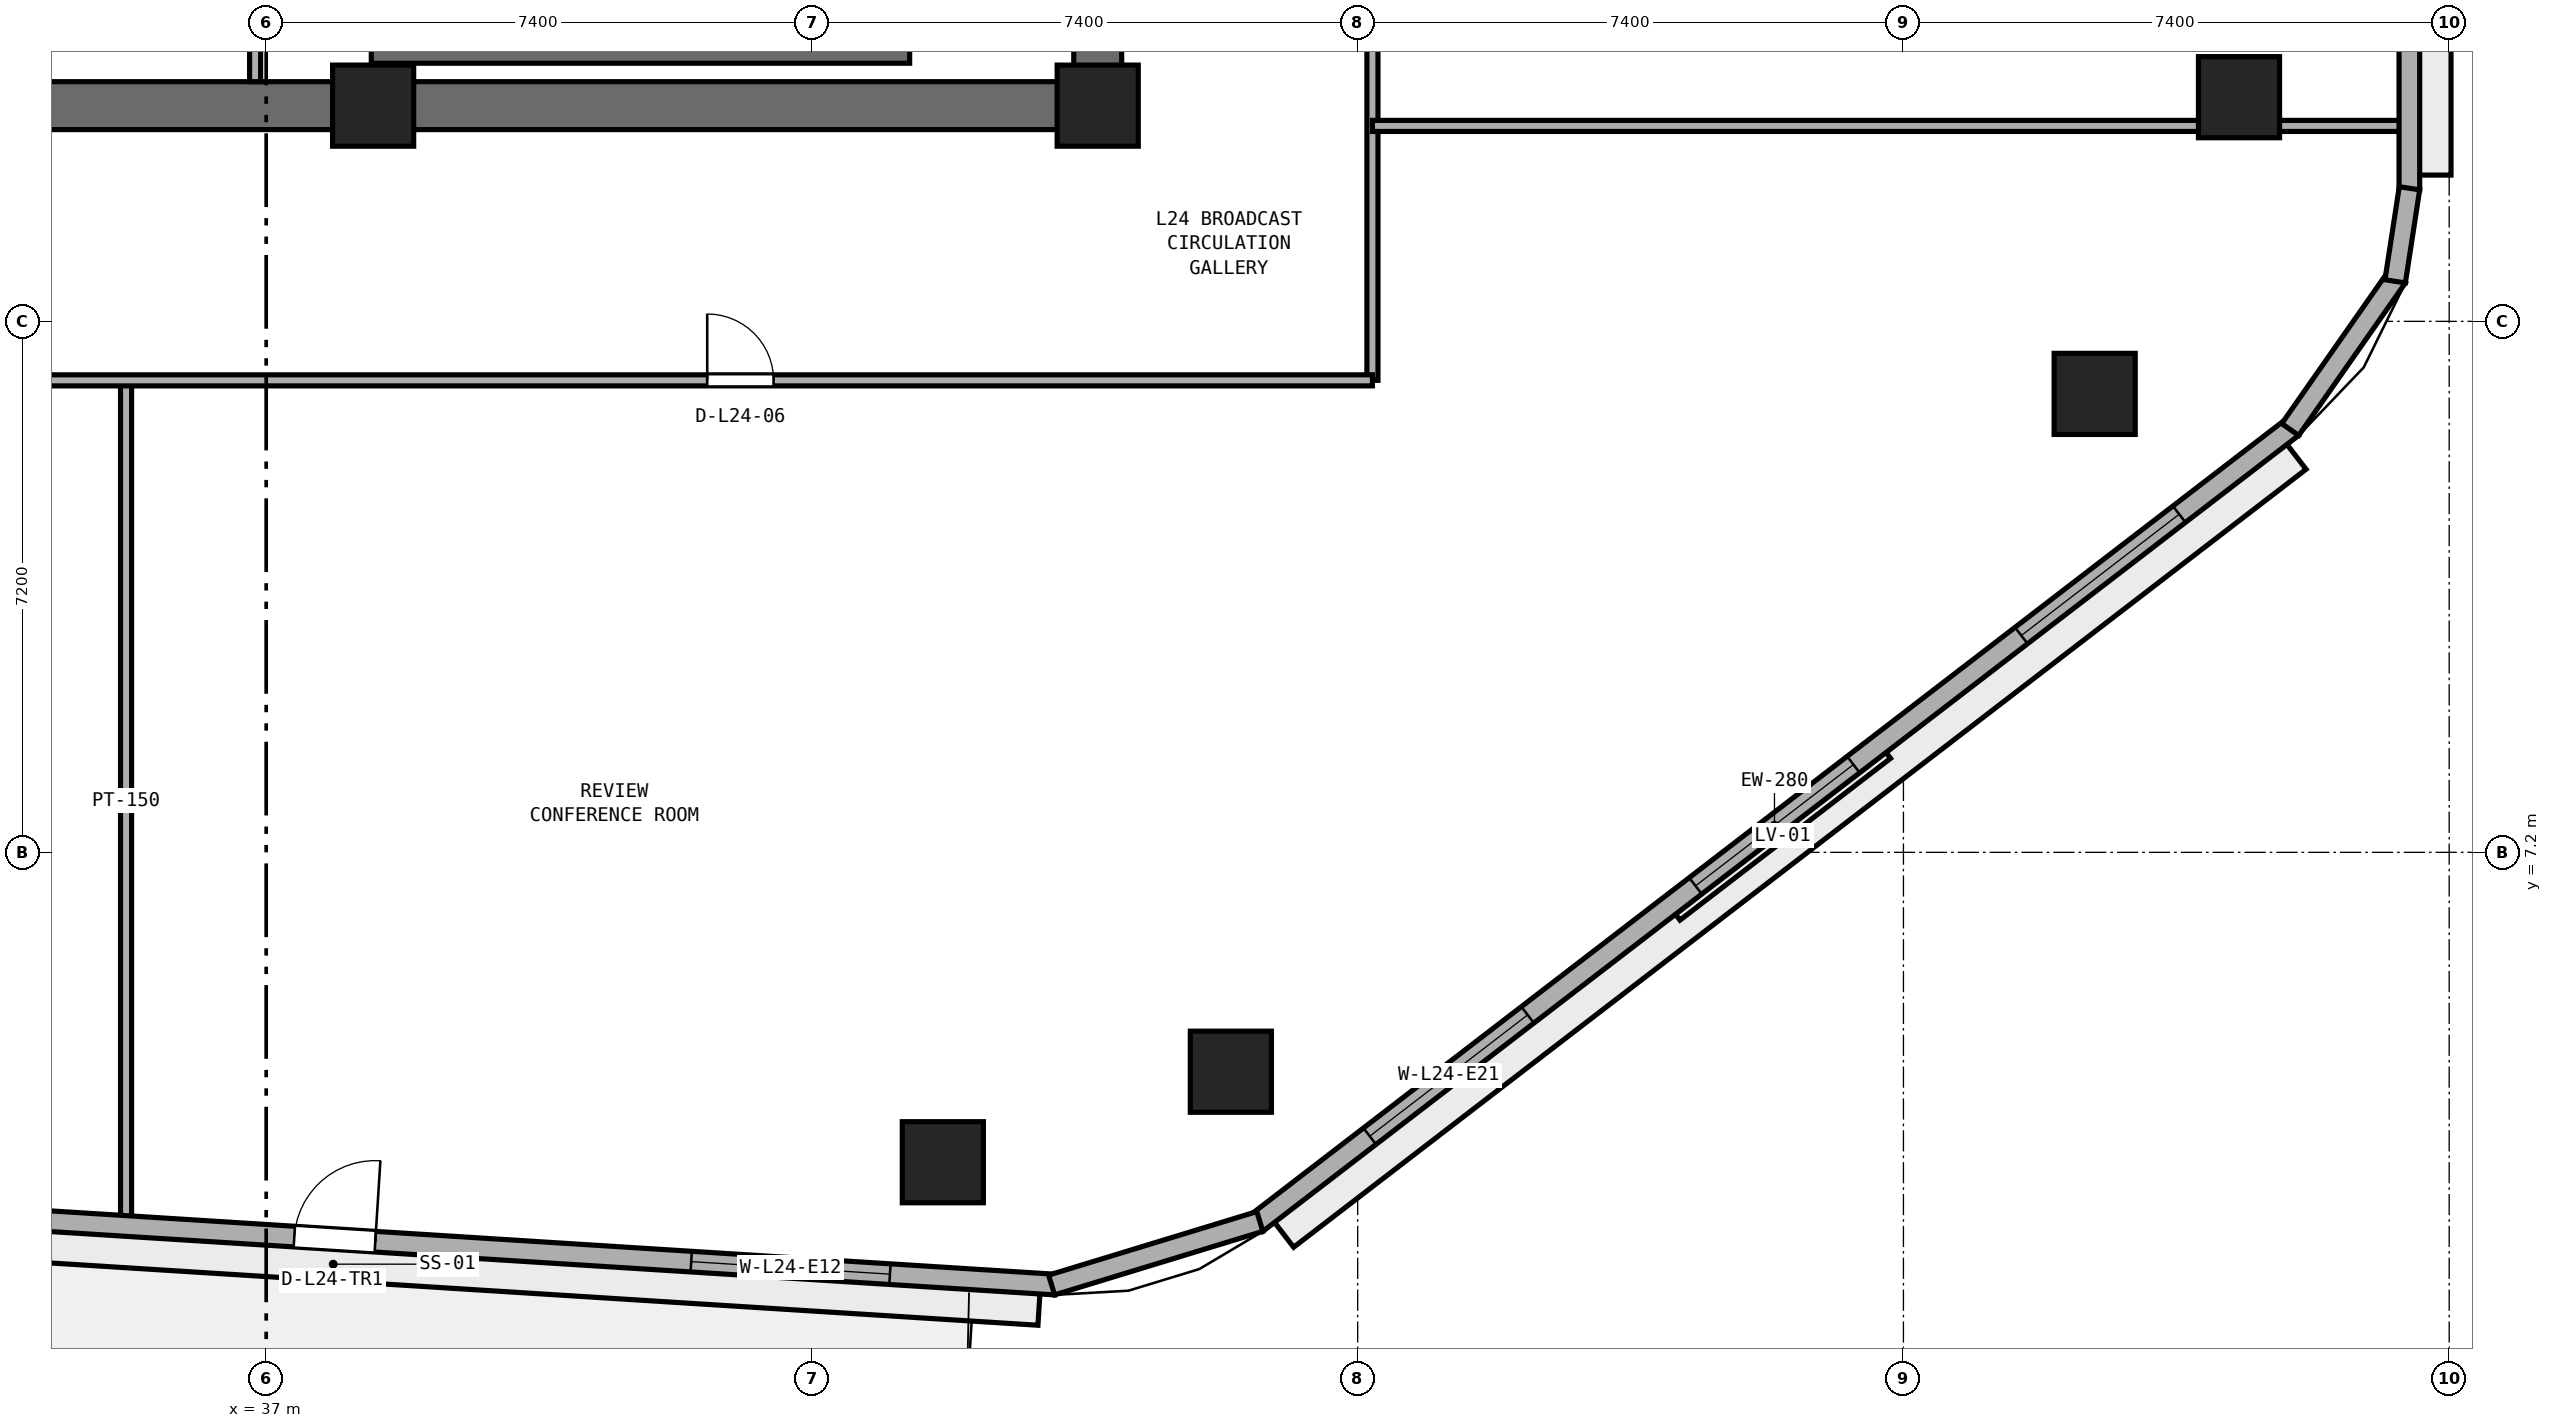
"""IFC4 building model, lengths in metres.
Left out: names, types, materials, properties, quantities, classifications, styles, units other than length and angle.
Written with IfcOpenShell. Run it as: python <this file> out.ifc"""

import sys

from ifc_helpers import new_model, si_unit, direction, frame, frame_2d, origin, origin_2d, place, context, subcontext, project, spatial, rectangle, extrude, element, fill, save


model = new_model("IFC4")
c1 = context("Model", 3, precision=1e-05, world=origin(), true_north=direction((0.0, 1.0)))
c2 = subcontext(c1, "Body", "Model", "MODEL_VIEW")
j1 = project(units=[si_unit("LENGTHUNIT", "METRE"), si_unit("PLANEANGLEUNIT", "RADIAN")], contexts=[c1])
p1 = place(None, origin())
s1 = spatial("IfcSite", under=j1, at=p1, CompositionType="ELEMENT")
p2 = place(p1, origin())
s2 = spatial("IfcBuilding", under=s1, at=p2, CompositionType="ELEMENT")
p3 = place(p2, frame((0.0, 0.0, 97.2)))
s3 = spatial("IfcBuildingStorey", under=s2, at=p3, CompositionType="ELEMENT", Elevation=97.2)
p4 = place(p3, frame((25.4, 17.325, 0.0), z_axis=(0.0, 0.0, 1.0), x_axis=(1.0, 0.0, 0.0)))
e1 = element("IfcWall", 1, at=p4, inside=s3, PredefinedType="SHEAR", context=c2, shape_type="SweptSolid", body=[
    extrude(rectangle(XDim=23.2, YDim=0.65, at=frame_2d((11.6, 0.0))), origin(), (0.0, 0.0, 1.0), 3.525),
])
p5 = place(p3, frame((48.275, 17.65, 0.0), z_axis=(0.0, 0.0, 1.0), x_axis=(0.0, 1.0, 0.0)))
e2 = element("IfcWall", 2, at=p5, inside=s3, PredefinedType="SHEAR", context=c2, shape_type="SweptSolid", body=[
    extrude(rectangle(XDim=15.1, YDim=0.65, at=frame_2d((7.55, 0.0))), origin(), (0.0, 0.0, 1.0), 3.525),
])
p6 = place(p5, frame((5.65, 0.0, 0.0)))
e3 = element("IfcOpeningElement", 3, at=p6, cuts=e2, PredefinedType="OPENING", context=c2, shape_type="SweptSolid", body=[
    extrude(rectangle(XDim=1.5, YDim=2.15, at=frame_2d((0.75, 1.075))), frame((0.0, 0.335, 0.0), z_axis=(0.0, -1.0, 0.0), x_axis=(1.0, 0.0, 0.0)), (0.0, 0.0, 1.0), 0.67),
])
for number, where, z_axis, x_axis in (
    (4, (38.45, 17.325, 0.0), (0.0, 0.0, 1.0), (1.0, 0.0, 0.0)),
    (5, (48.275, 17.325, 0.0), (0.0, 0.0, 1.0), (1.0, 0.0, 0.0)),
):
    element("IfcColumn", number, at=place(p3, frame(where, z_axis=z_axis, x_axis=x_axis)), inside=s3, PredefinedType="PILASTER", context=c2, shape_type="SweptSolid", body=[
        extrude(rectangle(XDim=1.1, YDim=1.1, at=origin_2d()), origin(), (0.0, 0.0, 1.0), 3.8),
    ])
for number, where, z_axis, x_axis in (
    (6, (46.175, 2.998, 0.0), (0.0, 0.0, 1.0), (1.0, 0.0, 0.0)),
    (7, (50.081, 4.225, 0.0), (0.0, 0.0, 1.0), (1.0, 0.0, 0.0)),
    (8, (61.793, 13.416, 0.0), (0.0, 0.0, 1.0), (1.0, 0.0, 0.0)),
    (9, (63.75, 17.44, 0.0), (0.0, 0.0, 1.0), (1.0, 0.0, 0.0)),
):
    element("IfcColumn", number, at=place(p3, frame(where, z_axis=z_axis, x_axis=x_axis)), inside=s3, PredefinedType="COLUMN", context=c2, shape_type="SweptSolid", body=[
        extrude(rectangle(XDim=1.1, YDim=1.1, at=origin_2d()), origin(), (0.0, 0.0, 1.0), 3.8),
    ])
p7 = place(p3, frame((38.425, 18.025, 0.0), z_axis=(0.0, 0.0, 1.0), x_axis=(1.0, 0.0, 0.0)))
e10 = element("IfcWall", 10, at=p7, inside=s3, PredefinedType="SHEAR", context=c2, shape_type="SweptSolid", body=[
    extrude(rectangle(XDim=7.3, YDim=0.25, at=frame_2d((3.65, 0.0))), origin(), (0.0, 0.0, 1.0), 3.525),
])
p8 = place(p3, frame((36.85, 17.65, 0.0), z_axis=(0.0, 0.0, 1.0), x_axis=(0.0, 1.0, 0.0)))
e11 = element("IfcWall", 11, at=p8, inside=s3, PredefinedType="PARTITIONING", context=c2, shape_type="SweptSolid", body=[
    extrude(rectangle(XDim=2.1, YDim=0.15, at=frame_2d((1.05, 0.0))), origin(), (0.0, 0.0, 1.0), 3.525),
])
p9 = place(p3, frame((52.0, 13.6, 0.0), z_axis=(0.0, 0.0, 1.0), x_axis=(0.0, 1.0, 0.0)))
e12 = element("IfcWall", 12, at=p9, inside=s3, PredefinedType="PARTITIONING", context=c2, shape_type="SweptSolid", body=[
    extrude(rectangle(XDim=33.691, YDim=0.15, at=frame_2d((16.846, 0.0))), origin(), (0.0, 0.0, 1.0), 3.525),
])
p10 = place(p9, frame((6.075, 0.0, 0.0)))
e13 = element("IfcOpeningElement", 13, at=p10, cuts=e12, PredefinedType="OPENING", context=c2, shape_type="SweptSolid", body=[
    extrude(rectangle(XDim=1.0, YDim=2.12, at=frame_2d((0.5, 1.06))), frame((0.0, 0.085, 0.0), z_axis=(0.0, -1.0, 0.0), x_axis=(1.0, 0.0, 0.0)), (0.0, 0.0, 1.0), 0.17),
])
p11 = place(p9, frame((12.6, 0.0, 0.0)))
e14 = element("IfcOpeningElement", 14, at=p11, cuts=e12, PredefinedType="OPENING", context=c2, shape_type="SweptSolid", body=[
    extrude(rectangle(XDim=1.0, YDim=2.12, at=frame_2d((0.5, 1.06))), frame((0.0, 0.085, 0.0), z_axis=(0.0, -1.0, 0.0), x_axis=(1.0, 0.0, 0.0)), (0.0, 0.0, 1.0), 0.17),
])
p12 = place(p9, frame((19.35, 0.0, 0.0)))
e15 = element("IfcOpeningElement", 15, at=p12, cuts=e12, PredefinedType="OPENING", context=c2, shape_type="SweptSolid", body=[
    extrude(rectangle(XDim=1.0, YDim=2.12, at=frame_2d((0.5, 1.06))), frame((0.0, 0.085, 0.0), z_axis=(0.0, -1.0, 0.0), x_axis=(1.0, 0.0, 0.0)), (0.0, 0.0, 1.0), 0.17),
])
p13 = place(p3, frame((35.1, 2.198, 0.0), z_axis=(0.0, 0.0, 1.0), x_axis=(0.0, 1.0, 0.0)))
e16 = element("IfcWall", 16, at=p13, inside=s3, PredefinedType="PARTITIONING", context=c2, shape_type="SweptSolid", body=[
    extrude(rectangle(XDim=11.402, YDim=0.15, at=frame_2d((5.701, 0.0))), origin(), (0.0, 0.0, 1.0), 3.525),
])
p14 = place(p3, frame((22.0, 13.6, 0.0), z_axis=(0.0, 0.0, 1.0), x_axis=(1.0, 0.0, 0.0)))
e17 = element("IfcWall", 17, at=p14, inside=s3, PredefinedType="PARTITIONING", context=c2, shape_type="SweptSolid", body=[
    extrude(rectangle(XDim=30.0, YDim=0.15, at=frame_2d((15.0, 0.0))), origin(), (0.0, 0.0, 1.0), 3.525),
])
p15 = place(p14, frame((6.22, 0.0, 0.0)))
e18 = element("IfcOpeningElement", 18, at=p15, cuts=e17, PredefinedType="OPENING", context=c2, shape_type="SweptSolid", body=[
    extrude(rectangle(XDim=0.9, YDim=2.1, at=frame_2d((0.45, 1.05))), frame((0.0, 0.085, 0.0), z_axis=(0.0, -1.0, 0.0), x_axis=(1.0, 0.0, 0.0)), (0.0, 0.0, 1.0), 0.17),
])
p16 = place(p14, frame((20.98, 0.0, 0.0)))
e19 = element("IfcOpeningElement", 19, at=p16, cuts=e17, PredefinedType="OPENING", context=c2, shape_type="SweptSolid", body=[
    extrude(rectangle(XDim=0.9, YDim=2.1, at=frame_2d((0.45, 1.05))), frame((0.0, 0.085, 0.0), z_axis=(0.0, -1.0, 0.0), x_axis=(1.0, 0.0, 0.0)), (0.0, 0.0, 1.0), 0.17),
])
p17 = place(p3, frame((52.0, 17.05, 0.0), z_axis=(0.0, 0.0, 1.0), x_axis=(1.0, 0.0, 0.0)))
e20 = element("IfcWall", 20, at=p17, inside=s3, PredefinedType="PARTITIONING", context=c2, shape_type="SweptSolid", body=[
    extrude(rectangle(XDim=13.995, YDim=0.15, at=frame_2d((6.998, 0.0))), origin(), (0.0, 0.0, 1.0), 3.525),
])
p18 = place(p3, frame((28.161, 2.571, 0.0), z_axis=(0.0, 0.0, 1.0), x_axis=(0.998017288298, -0.06294038654, 0.0)))
e21 = element("IfcWall", 21, at=p18, inside=s3, PredefinedType="STANDARD", context=c2, shape_type="SweptSolid", body=[
    extrude(rectangle(XDim=19.577, YDim=0.28, at=frame_2d((9.789, 0.0))), origin(), (0.0, 0.0, 1.0), 3.525),
])
p19 = place(p18, frame((9.239, 0.0, 0.0)))
e22 = element("IfcOpeningElement", 22, at=p19, cuts=e21, PredefinedType="OPENING", context=c2, shape_type="SweptSolid", body=[
    extrude(rectangle(XDim=1.1, YDim=2.2, at=frame_2d((0.55, 1.1))), frame((0.0, 0.15, 0.0), z_axis=(0.0, -1.0, 0.0), x_axis=(1.0, 0.0, 0.0)), (0.0, 0.0, 1.0), 0.3),
])
p20 = place(p18, frame((2.246, 0.0, 0.9)))
e23 = element("IfcOpeningElement", 23, at=p20, cuts=e21, PredefinedType="OPENING", context=c2, shape_type="SweptSolid", body=[
    extrude(rectangle(XDim=2.7, YDim=1.75, at=frame_2d((1.35, 0.875))), frame((0.0, 0.15, 0.0), z_axis=(0.0, -1.0, 0.0), x_axis=(1.0, 0.0, 0.0)), (0.0, 0.0, 1.0), 0.3),
])
p21 = place(p18, frame((14.631, 0.0, 0.9)))
e24 = element("IfcOpeningElement", 24, at=p21, cuts=e21, PredefinedType="OPENING", context=c2, shape_type="SweptSolid", body=[
    extrude(rectangle(XDim=2.7, YDim=1.75, at=frame_2d((1.35, 0.875))), frame((0.0, 0.15, 0.0), z_axis=(0.0, -1.0, 0.0), x_axis=(1.0, 0.0, 0.0)), (0.0, 0.0, 1.0), 0.3),
])
p22 = place(p3, frame((50.429, 2.172, 0.0), z_axis=(0.0, 0.0, 1.0), x_axis=(0.792937466367, 0.609303023488, 0.0)))
e25 = element("IfcWall", 25, at=p22, inside=s3, PredefinedType="STANDARD", context=c2, shape_type="SweptSolid", body=[
    extrude(rectangle(XDim=17.713, YDim=0.28, at=frame_2d((8.856, 0.0))), origin(), (0.0, 0.0, 1.0), 3.525),
])
p23 = place(p22, frame((1.936, 0.0, 0.9)))
e26 = element("IfcOpeningElement", 26, at=p23, cuts=e25, PredefinedType="OPENING", context=c2, shape_type="SweptSolid", body=[
    extrude(rectangle(XDim=2.7, YDim=1.75, at=frame_2d((1.35, 0.875))), frame((0.0, 0.15, 0.0), z_axis=(0.0, -1.0, 0.0), x_axis=(1.0, 0.0, 0.0)), (0.0, 0.0, 1.0), 0.3),
])
p24 = place(p22, frame((7.506, 0.0, 0.9)))
e27 = element("IfcOpeningElement", 27, at=p24, cuts=e25, PredefinedType="OPENING", context=c2, shape_type="SweptSolid", body=[
    extrude(rectangle(XDim=2.7, YDim=1.75, at=frame_2d((1.35, 0.875))), frame((0.0, 0.15, 0.0), z_axis=(0.0, -1.0, 0.0), x_axis=(1.0, 0.0, 0.0)), (0.0, 0.0, 1.0), 0.3),
])
p25 = place(p22, frame((13.077, 0.0, 0.9)))
e28 = element("IfcOpeningElement", 28, at=p25, cuts=e25, PredefinedType="OPENING", context=c2, shape_type="SweptSolid", body=[
    extrude(rectangle(XDim=2.7, YDim=1.75, at=frame_2d((1.35, 0.875))), frame((0.0, 0.15, 0.0), z_axis=(0.0, -1.0, 0.0), x_axis=(1.0, 0.0, 0.0)), (0.0, 0.0, 1.0), 0.3),
])
p26 = place(p3, frame((66.06, 16.183, 0.0), z_axis=(0.0, 0.0, 1.0), x_axis=(0.0, 1.0, 0.0)))
e29 = element("IfcWall", 29, at=p26, inside=s3, PredefinedType="STANDARD", context=c2, shape_type="SweptSolid", body=[
    extrude(rectangle(XDim=19.331, YDim=0.28, at=frame_2d((9.666, 0.0))), origin(), (0.0, 0.0, 1.0), 3.525),
])
p27 = place(p26, frame((2.205, 0.0, 0.9)))
e30 = element("IfcOpeningElement", 30, at=p27, cuts=e29, PredefinedType="OPENING", context=c2, shape_type="SweptSolid", body=[
    extrude(rectangle(XDim=2.7, YDim=1.75, at=frame_2d((1.35, 0.875))), frame((0.0, 0.15, 0.0), z_axis=(0.0, -1.0, 0.0), x_axis=(1.0, 0.0, 0.0)), (0.0, 0.0, 1.0), 0.3),
])
p28 = place(p26, frame((8.315, 0.0, 0.9)))
e31 = element("IfcOpeningElement", 31, at=p28, cuts=e29, PredefinedType="OPENING", context=c2, shape_type="SweptSolid", body=[
    extrude(rectangle(XDim=2.7, YDim=1.75, at=frame_2d((1.35, 0.875))), frame((0.0, 0.15, 0.0), z_axis=(0.0, -1.0, 0.0), x_axis=(1.0, 0.0, 0.0)), (0.0, 0.0, 1.0), 0.3),
])
p29 = place(p26, frame((14.426, 0.0, 0.9)))
e32 = element("IfcOpeningElement", 32, at=p29, cuts=e29, PredefinedType="OPENING", context=c2, shape_type="SweptSolid", body=[
    extrude(rectangle(XDim=2.7, YDim=1.75, at=frame_2d((1.35, 0.875))), frame((0.0, 0.15, 0.0), z_axis=(0.0, -1.0, 0.0), x_axis=(1.0, 0.0, 0.0)), (0.0, 0.0, 1.0), 0.3),
])
p30 = place(p3, frame((47.65, 1.333, 0.0), z_axis=(0.0, 0.0, 1.0), x_axis=(0.956461287977, 0.291859220516, 0.0)))
e33 = element("IfcWall", 33, at=p30, inside=s3, PredefinedType="STANDARD", context=c2, shape_type="SweptSolid", body=[
    extrude(rectangle(XDim=2.952, YDim=0.28, at=frame_2d((1.476, 0.0))), origin(), (0.0, 0.0, 1.0), 3.525),
])
p31 = place(p3, frame((64.444, 12.933, 0.0), z_axis=(0.0, 0.0, 1.0), x_axis=(0.573176686443, 0.819431806875, 0.0)))
e34 = element("IfcWall", 34, at=p31, inside=s3, PredefinedType="STANDARD", context=c2, shape_type="SweptSolid", body=[
    extrude(rectangle(XDim=2.524, YDim=0.28, at=frame_2d((1.262, 0.0))), origin(), (0.0, 0.0, 1.0), 3.525),
])
p32 = place(p3, frame((65.867, 14.943, 0.0), z_axis=(0.0, 0.0, 1.0), x_axis=(0.152014078361, 0.988378328364, 0.0)))
e35 = element("IfcWall", 35, at=p32, inside=s3, PredefinedType="STANDARD", context=c2, shape_type="SweptSolid", body=[
    extrude(rectangle(XDim=1.277, YDim=0.28, at=frame_2d((0.638, 0.0))), origin(), (0.0, 0.0, 1.0), 3.525),
])
p33 = place(p16, origin())
e36 = element("IfcDoor", 36, at=p33, inside=s3, OperationType="SINGLE_SWING_LEFT", PredefinedType="DOOR", context=c2, shape_type="SweptSolid", body=[
    extrude(rectangle(XDim=0.9, YDim=2.1, at=frame_2d((0.45, 1.05))), frame((0.0, 0.025, 0.0), z_axis=(0.0, -1.0, 0.0), x_axis=(1.0, 0.0, 0.0)), (0.0, 0.0, 1.0), 0.05),
])
fill(e19, e36)
p34 = place(p19, origin())
e37 = element("IfcDoor", 37, at=p34, inside=s3, OperationType="SINGLE_SWING_RIGHT", PredefinedType="DOOR", context=c2, shape_type="SweptSolid", body=[
    extrude(rectangle(XDim=1.1, YDim=2.2, at=frame_2d((0.55, 1.1))), frame((0.0, 0.025, 0.0), z_axis=(0.0, -1.0, 0.0), x_axis=(1.0, 0.0, 0.0)), (0.0, 0.0, 1.0), 0.05),
])
fill(e22, e37)
p35 = place(p21, origin())
e38 = element("IfcWindow", 38, at=p35, inside=s3, PartitioningType="SINGLE_PANEL", PredefinedType="WINDOW", context=c2, shape_type="SweptSolid", body=[
    extrude(rectangle(XDim=2.7, YDim=1.75, at=frame_2d((1.35, 0.875))), frame((0.0, 0.03, 0.0), z_axis=(0.0, -1.0, 0.0), x_axis=(1.0, 0.0, 0.0)), (0.0, 0.0, 1.0), 0.06),
])
fill(e24, e38)
p36 = place(p23, origin())
e39 = element("IfcWindow", 39, at=p36, inside=s3, PartitioningType="SINGLE_PANEL", PredefinedType="WINDOW", context=c2, shape_type="SweptSolid", body=[
    extrude(rectangle(XDim=2.7, YDim=1.75, at=frame_2d((1.35, 0.875))), frame((0.0, 0.03, 0.0), z_axis=(0.0, -1.0, 0.0), x_axis=(1.0, 0.0, 0.0)), (0.0, 0.0, 1.0), 0.06),
])
fill(e26, e39)
p37 = place(p24, origin())
e40 = element("IfcWindow", 40, at=p37, inside=s3, PartitioningType="SINGLE_PANEL", PredefinedType="WINDOW", context=c2, shape_type="SweptSolid", body=[
    extrude(rectangle(XDim=2.7, YDim=1.75, at=frame_2d((1.35, 0.875))), frame((0.0, 0.03, 0.0), z_axis=(0.0, -1.0, 0.0), x_axis=(1.0, 0.0, 0.0)), (0.0, 0.0, 1.0), 0.06),
])
fill(e27, e40)
p38 = place(p25, origin())
e41 = element("IfcWindow", 41, at=p38, inside=s3, PartitioningType="SINGLE_PANEL", PredefinedType="WINDOW", context=c2, shape_type="SweptSolid", body=[
    extrude(rectangle(XDim=2.7, YDim=1.75, at=frame_2d((1.35, 0.875))), frame((0.0, 0.03, 0.0), z_axis=(0.0, -1.0, 0.0), x_axis=(1.0, 0.0, 0.0)), (0.0, 0.0, 1.0), 0.06),
])
fill(e28, e41)
save(model, sys.argv[1])
